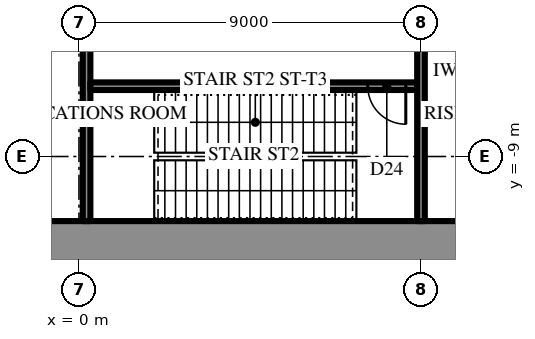
"""IFC4 building model, lengths in metres.
Left out: names, types, materials, properties, quantities, classifications, styles, units other than length and angle.
Written with IfcOpenShell. Run it as: python <this file> out.ifc"""

import sys

from ifc_helpers import new_model, si_unit, direction, frame, frame_2d, origin, place, context, subcontext, project, spatial, rectangle, extrude, element, fill, save


model = new_model("IFC4")
c1 = context("Model", 3, precision=1e-05, world=origin(), true_north=direction((0.0, 1.0)))
c2 = subcontext(c1, "Body", "Model", "MODEL_VIEW")
j1 = project(units=[si_unit("LENGTHUNIT", "METRE"), si_unit("PLANEANGLEUNIT", "RADIAN")], contexts=[c1])
p1 = place(None, origin())
s1 = spatial("IfcSite", under=j1, at=p1, CompositionType="ELEMENT")
p2 = place(p1, origin())
s2 = spatial("IfcBuilding", under=s1, at=p2, CompositionType="ELEMENT")
p3 = place(p2, frame((0.0, 0.0, 299.5)))
s3 = spatial("IfcBuildingStorey", under=s2, at=p3, CompositionType="ELEMENT", Elevation=299.5)
p4 = place(p3, frame((15.5, -11.5, 0.0), z_axis=(0.0, 0.0, 1.0), x_axis=(-1.0, 0.0, 0.0)))
e1 = element("IfcWall", 1, at=p4, inside=s3, PredefinedType="SHEAR", context=c2, shape_type="SweptSolid", body=[
    extrude(rectangle(XDim=31.0, YDim=1.6, at=frame_2d((15.5, 0.0))), origin(), (0.0, 0.0, 1.0), 7.0),
])
p5 = place(p4, frame((16.35, 0.0, 0.0)))
e2 = element("IfcOpeningElement", 2, at=p5, cuts=e1, PredefinedType="OPENING", context=c2, shape_type="SweptSolid", body=[
    extrude(rectangle(XDim=0.9, YDim=2.2, at=frame_2d((0.45, 1.1))), frame((0.0, 0.81, 0.0), z_axis=(0.0, -1.0, 0.0), x_axis=(1.0, 0.0, 0.0)), (0.0, 0.0, 1.0), 1.62),
])
p6 = place(p4, frame((19.35, 0.0, 0.0)))
e3 = element("IfcOpeningElement", 3, at=p6, cuts=e1, PredefinedType="OPENING", context=c2, shape_type="SweptSolid", body=[
    extrude(rectangle(XDim=0.9, YDim=2.2, at=frame_2d((0.45, 1.1))), frame((0.0, 0.81, 0.0), z_axis=(0.0, -1.0, 0.0), x_axis=(1.0, 0.0, 0.0)), (0.0, 0.0, 1.0), 1.62),
])
p7 = place(p4, frame((22.4, 0.0, 0.0)))
e4 = element("IfcOpeningElement", 4, at=p7, cuts=e1, PredefinedType="OPENING", context=c2, shape_type="SweptSolid", body=[
    extrude(rectangle(XDim=1.0, YDim=2.2, at=frame_2d((0.5, 1.1))), frame((0.0, 0.81, 0.0), z_axis=(0.0, -1.0, 0.0), x_axis=(1.0, 0.0, 0.0)), (0.0, 0.0, 1.0), 1.62),
])
p8 = place(p4, frame((1.65, 0.0, 0.0)))
e5 = element("IfcOpeningElement", 5, at=p8, cuts=e1, PredefinedType="OPENING", context=c2, shape_type="SweptSolid", body=[
    extrude(rectangle(XDim=0.9, YDim=2.2, at=frame_2d((0.45, 1.1))), frame((0.0, 0.81, 0.0), z_axis=(0.0, -1.0, 0.0), x_axis=(1.0, 0.0, 0.0)), (0.0, 0.0, 1.0), 1.62),
])
p9 = place(p4, frame((4.65, 0.0, 0.0)))
e6 = element("IfcOpeningElement", 6, at=p9, cuts=e1, PredefinedType="OPENING", context=c2, shape_type="SweptSolid", body=[
    extrude(rectangle(XDim=0.9, YDim=2.2, at=frame_2d((0.45, 1.1))), frame((0.0, 0.81, 0.0), z_axis=(0.0, -1.0, 0.0), x_axis=(1.0, 0.0, 0.0)), (0.0, 0.0, 1.0), 1.62),
])
p10 = place(p4, frame((25.45, 0.0, 0.0)))
e7 = element("IfcOpeningElement", 7, at=p10, cuts=e1, PredefinedType="OPENING", context=c2, shape_type="SweptSolid", body=[
    extrude(rectangle(XDim=0.9, YDim=2.2, at=frame_2d((0.45, 1.1))), frame((0.0, 0.81, 0.0), z_axis=(0.0, -1.0, 0.0), x_axis=(1.0, 0.0, 0.0)), (0.0, 0.0, 1.0), 1.62),
])
p11 = place(p4, frame((28.45, 0.0, 0.0)))
e8 = element("IfcOpeningElement", 8, at=p11, cuts=e1, PredefinedType="OPENING", context=c2, shape_type="SweptSolid", body=[
    extrude(rectangle(XDim=0.9, YDim=2.2, at=frame_2d((0.45, 1.1))), frame((0.0, 0.81, 0.0), z_axis=(0.0, -1.0, 0.0), x_axis=(1.0, 0.0, 0.0)), (0.0, 0.0, 1.0), 1.62),
])
p12 = place(p3, frame((0.2, -5.05, 0.0), z_axis=(0.0, 0.0, 1.0), x_axis=(0.0, -1.0, 0.0)))
e9 = element("IfcWall", 9, at=p12, inside=s3, PredefinedType="SHEAR", context=c2, shape_type="SweptSolid", body=[
    extrude(rectangle(XDim=5.65, YDim=0.2, at=frame_2d((2.825, 0.0))), origin(), (0.0, 0.0, 1.0), 7.0),
])
p13 = place(p3, frame((8.9, -7.15, 0.0), z_axis=(0.0, 0.0, 1.0), x_axis=(-1.0, 0.0, 0.0)))
e10 = element("IfcWall", 10, at=p13, inside=s3, PredefinedType="SHEAR", context=c2, shape_type="SweptSolid", body=[
    extrude(rectangle(XDim=8.6, YDim=0.2, at=frame_2d((4.3, 0.0))), origin(), (0.0, 0.0, 1.0), 7.0),
])
p14 = place(p13, frame((0.3, 0.0, 0.0)))
e11 = element("IfcOpeningElement", 11, at=p14, cuts=e10, PredefinedType="OPENING", context=c2, shape_type="SweptSolid", body=[
    extrude(rectangle(XDim=1.0, YDim=2.2, at=frame_2d((0.5, 1.1))), frame((0.0, 0.11, 0.0), z_axis=(0.0, -1.0, 0.0), x_axis=(1.0, 0.0, 0.0)), (0.0, 0.0, 1.0), 0.22),
])
p15 = place(p3, frame((9.0, -5.05, 0.0), z_axis=(0.0, 0.0, 1.0), x_axis=(0.0, -1.0, 0.0)))
e12 = element("IfcWall", 12, at=p15, inside=s3, PredefinedType="PARTITIONING", context=c2, shape_type="SweptSolid", body=[
    extrude(rectangle(XDim=5.65, YDim=0.2, at=frame_2d((2.825, 0.0))), origin(), (0.0, 0.0, 1.0), 6.7),
])
p16 = place(p14, origin())
e13 = element("IfcDoor", 13, at=p16, inside=s3, OperationType="SINGLE_SWING_RIGHT", PredefinedType="DOOR", context=c2, shape_type="SweptSolid", body=[
    extrude(rectangle(XDim=1.0, YDim=2.2, at=frame_2d((0.5, 1.1))), frame((0.0, 0.025, 0.0), z_axis=(0.0, -1.0, 0.0), x_axis=(1.0, 0.0, 0.0)), (0.0, 0.0, 1.0), 0.05),
])
fill(e11, e13)
save(model, sys.argv[1])
